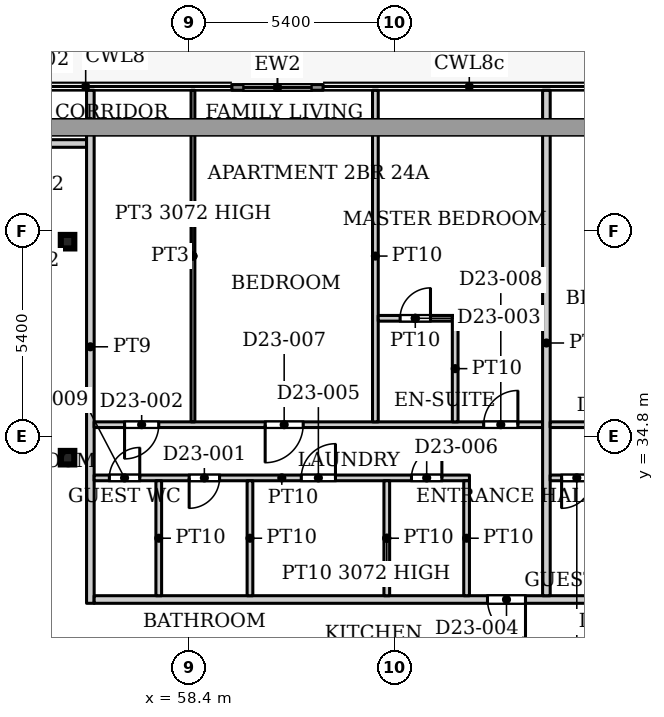
"""IFC4 building model, lengths in metres.
Left out: names, types, materials, properties, quantities, classifications, styles, units other than length and angle.
Written with IfcOpenShell. Run it as: python <this file> out.ifc"""

import sys

from ifc_helpers import new_model, si_unit, direction, frame, frame_2d, origin, origin_2d, place, context, subcontext, project, spatial, rectangle, hollow_rectangle, extrude, source, transform, mapped, element, fill, save


model = new_model("IFC4")
c1 = context("Model", 3, precision=1e-05, world=origin(), true_north=direction((0.0, 1.0)))
c2 = subcontext(c1, "Body", "Model", "MODEL_VIEW")
j1 = project(units=[si_unit("LENGTHUNIT", "METRE"), si_unit("PLANEANGLEUNIT", "RADIAN")], contexts=[c1])
p1 = place(None, origin())
s1 = spatial("IfcSite", under=j1, at=p1, CompositionType="ELEMENT")
p2 = place(p1, origin())
s2 = spatial("IfcBuilding", under=s1, at=p2, CompositionType="ELEMENT")
p3 = place(p2, frame((0.0, 0.0, 105.8)))
s3 = spatial("IfcBuildingStorey", under=s2, at=p3, CompositionType="ELEMENT", Elevation=105.8)
for number, where, z_axis, x_axis in (
    (1, (55.2, 34.232, 0.0), (0.0, 0.0, 1.0), (1.0, 0.0, 0.0)),
    (2, (55.2, 39.916, 0.0), (0.0, 0.0, 1.0), (1.0, 0.0, 0.0)),
):
    element("IfcColumn", number, at=place(p3, frame(where, z_axis=z_axis, x_axis=x_axis)), inside=s3, PredefinedType="COLUMN", context=c2, shape_type="SweptSolid", body=[
        extrude(hollow_rectangle(XDim=0.356, YDim=0.356, WallThickness=0.016, InnerFilletRadius=0.016, OuterFilletRadius=0.032, at=origin_2d()), origin(), (0.0, 0.0, 1.0), 3.9),
    ])
p4 = place(p3, frame((59.524, 43.975, 0.0), z_axis=(0.0, 0.0, 1.0), x_axis=(1.0, 0.0, 0.0)))
e3 = element("IfcWall", 3, at=p4, inside=s3, PredefinedType="SOLIDWALL", context=c2, shape_type="SweptSolid", body=[
    extrude(rectangle(XDim=2.4, YDim=0.15, at=frame_2d((1.2, 0.0))), origin(), (0.0, 0.0, 1.0), 3.75),
])
p5 = place(p4, frame((0.3, 0.0, 0.0)))
e4 = element("IfcOpeningElement", 4, at=p5, cuts=e3, PredefinedType="OPENING", context=c2, shape_type="SweptSolid", body=[
    extrude(rectangle(XDim=1.8, YDim=2.4, at=frame_2d((0.9, 1.2))), frame((0.0, 0.085, 0.0), z_axis=(0.0, -1.0, 0.0), x_axis=(1.0, 0.0, 0.0)), (0.0, 0.0, 1.0), 0.17),
])
p6 = place(p3, frame((53.5, 42.5, 0.0), z_axis=(0.0, 0.0, 1.0), x_axis=(1.0, 0.0, 0.0)))
e5 = element("IfcWall", 5, at=p6, inside=s3, PredefinedType="PARTITIONING", context=c2, shape_type="SweptSolid", body=[
    extrude(rectangle(XDim=2.2, YDim=0.2, at=frame_2d((1.1, 0.0))), origin(), (0.0, 0.0, 1.0), 3.6),
])
p7 = place(p6, frame((0.15, 0.0, 0.0)))
e6 = element("IfcOpeningElement", 6, at=p7, cuts=e5, PredefinedType="OPENING", context=c2, shape_type="SweptSolid", body=[
    extrude(rectangle(XDim=1.0, YDim=2.1, at=frame_2d((0.5, 1.05))), frame((0.0, 0.11, 0.0), z_axis=(0.0, -1.0, 0.0), x_axis=(1.0, 0.0, 0.0)), (0.0, 0.0, 1.0), 0.22),
])
p8 = place(p3, frame((55.8, 30.4, 0.0), z_axis=(0.0, 0.0, 1.0), x_axis=(0.0, 1.0, 0.0)))
e7 = element("IfcWall", 7, at=p8, inside=s3, PredefinedType="PARTITIONING", context=c2, shape_type="SweptSolid", body=[
    extrude(rectangle(XDim=13.5, YDim=0.2, at=frame_2d((6.75, 0.0))), origin(), (0.0, 0.0, 1.0), 3.6),
])
p9 = place(p3, frame((55.9, 30.5, 0.0), z_axis=(0.0, 0.0, 1.0), x_axis=(1.0, 0.0, 0.0)))
e8 = element("IfcWall", 8, at=p9, inside=s3, PredefinedType="PARTITIONING", context=c2, shape_type="SweptSolid", body=[
    extrude(rectangle(XDim=42.2, YDim=0.2, at=frame_2d((21.1, 0.0))), origin(), (0.0, 0.0, 1.0), 3.6),
])
p10 = place(p9, frame((10.35, 0.0, 0.0)))
e9 = element("IfcOpeningElement", 9, at=p10, cuts=e8, PredefinedType="OPENING", context=c2, shape_type="SweptSolid", body=[
    extrude(rectangle(XDim=1.0, YDim=2.1, at=frame_2d((0.5, 1.05))), frame((0.0, 0.11, 0.0), z_axis=(0.0, -1.0, 0.0), x_axis=(1.0, 0.0, 0.0)), (0.0, 0.0, 1.0), 0.22),
])
p11 = place(p9, frame((16.65, 0.0, 0.0)))
e10 = element("IfcOpeningElement", 10, at=p11, cuts=e8, PredefinedType="OPENING", context=c2, shape_type="SweptSolid", body=[
    extrude(rectangle(XDim=1.0, YDim=2.1, at=frame_2d((0.5, 1.05))), frame((0.0, 0.11, 0.0), z_axis=(0.0, -1.0, 0.0), x_axis=(1.0, 0.0, 0.0)), (0.0, 0.0, 1.0), 0.22),
])
p12 = place(p9, frame((27.6, 0.0, 0.0)))
e11 = element("IfcOpeningElement", 11, at=p12, cuts=e8, PredefinedType="OPENING", context=c2, shape_type="SweptSolid", body=[
    extrude(rectangle(XDim=1.0, YDim=2.1, at=frame_2d((0.5, 1.05))), frame((0.0, 0.11, 0.0), z_axis=(0.0, -1.0, 0.0), x_axis=(1.0, 0.0, 0.0)), (0.0, 0.0, 1.0), 0.22),
])
p13 = place(p9, frame((36.0, 0.0, 0.0)))
e12 = element("IfcOpeningElement", 12, at=p13, cuts=e8, PredefinedType="OPENING", context=c2, shape_type="SweptSolid", body=[
    extrude(rectangle(XDim=1.0, YDim=2.1, at=frame_2d((0.5, 1.05))), frame((0.0, 0.11, 0.0), z_axis=(0.0, -1.0, 0.0), x_axis=(1.0, 0.0, 0.0)), (0.0, 0.0, 1.0), 0.22),
])
p14 = place(p3, frame((55.9, 33.7, 0.0), z_axis=(0.0, 0.0, 1.0), x_axis=(1.0, 0.0, 0.0)))
e13 = element("IfcWall", 13, at=p14, inside=s3, PredefinedType="PARTITIONING", context=c2, shape_type="SweptSolid", body=[
    extrude(rectangle(XDim=9.875, YDim=0.15, at=frame_2d((4.938, 0.0))), origin(), (0.0, 0.0, 1.0), 3.6),
])
p15 = place(p14, frame((2.5, 0.0, 0.0)))
e14 = element("IfcOpeningElement", 14, at=p15, cuts=e13, PredefinedType="OPENING", context=c2, shape_type="SweptSolid", body=[
    extrude(rectangle(XDim=0.8, YDim=2.1, at=frame_2d((0.4, 1.05))), frame((0.0, 0.085, 0.0), z_axis=(0.0, -1.0, 0.0), x_axis=(1.0, 0.0, 0.0)), (0.0, 0.0, 1.0), 0.17),
])
p16 = place(p14, frame((5.45, 0.0, 0.0)))
e15 = element("IfcOpeningElement", 15, at=p16, cuts=e13, PredefinedType="OPENING", context=c2, shape_type="SweptSolid", body=[
    extrude(rectangle(XDim=0.9, YDim=2.1, at=frame_2d((0.45, 1.05))), frame((0.0, 0.085, 0.0), z_axis=(0.0, -1.0, 0.0), x_axis=(1.0, 0.0, 0.0)), (0.0, 0.0, 1.0), 0.17),
])
p17 = place(p14, frame((8.35, 0.0, 0.0)))
e16 = element("IfcOpeningElement", 16, at=p17, cuts=e13, PredefinedType="OPENING", context=c2, shape_type="SweptSolid", body=[
    extrude(rectangle(XDim=0.8, YDim=2.1, at=frame_2d((0.4, 1.05))), frame((0.0, 0.085, 0.0), z_axis=(0.0, -1.0, 0.0), x_axis=(1.0, 0.0, 0.0)), (0.0, 0.0, 1.0), 0.17),
])
p18 = place(p14, frame((0.4, 0.0, 0.0)))
e17 = element("IfcOpeningElement", 17, at=p18, cuts=e13, PredefinedType="OPENING", context=c2, shape_type="SweptSolid", body=[
    extrude(rectangle(XDim=0.8, YDim=2.1, at=frame_2d((0.4, 1.05))), frame((0.0, 0.085, 0.0), z_axis=(0.0, -1.0, 0.0), x_axis=(1.0, 0.0, 0.0)), (0.0, 0.0, 1.0), 0.17),
])
p19 = place(p3, frame((55.9, 35.1, 0.0), z_axis=(0.0, 0.0, 1.0), x_axis=(1.0, 0.0, 0.0)))
e18 = element("IfcWall", 18, at=p19, inside=s3, PredefinedType="PARTITIONING", context=c2, shape_type="SweptSolid", body=[
    extrude(rectangle(XDim=11.8, YDim=0.15, at=frame_2d((5.9, 0.0))), origin(), (0.0, 0.0, 1.0), 3.6),
])
p20 = place(p19, frame((0.8, 0.0, 0.0)))
e19 = element("IfcOpeningElement", 19, at=p20, cuts=e18, PredefinedType="OPENING", context=c2, shape_type="SweptSolid", body=[
    extrude(rectangle(XDim=0.9, YDim=2.1, at=frame_2d((0.45, 1.05))), frame((0.0, 0.085, 0.0), z_axis=(0.0, -1.0, 0.0), x_axis=(1.0, 0.0, 0.0)), (0.0, 0.0, 1.0), 0.17),
])
p21 = place(p19, frame((4.5, 0.0, 0.0)))
e20 = element("IfcOpeningElement", 20, at=p21, cuts=e18, PredefinedType="OPENING", context=c2, shape_type="SweptSolid", body=[
    extrude(rectangle(XDim=1.0, YDim=2.1, at=frame_2d((0.5, 1.05))), frame((0.0, 0.085, 0.0), z_axis=(0.0, -1.0, 0.0), x_axis=(1.0, 0.0, 0.0)), (0.0, 0.0, 1.0), 0.17),
])
p22 = place(p19, frame((10.25, 0.0, 0.0)))
e21 = element("IfcOpeningElement", 21, at=p22, cuts=e18, PredefinedType="OPENING", context=c2, shape_type="SweptSolid", body=[
    extrude(rectangle(XDim=0.9, YDim=2.1, at=frame_2d((0.45, 1.05))), frame((0.0, 0.085, 0.0), z_axis=(0.0, -1.0, 0.0), x_axis=(1.0, 0.0, 0.0)), (0.0, 0.0, 1.0), 0.17),
])
p23 = place(p3, frame((57.6, 30.6, 0.0), z_axis=(0.0, 0.0, 1.0), x_axis=(0.0, 1.0, 0.0)))
e22 = element("IfcWall", 22, at=p23, inside=s3, PredefinedType="PARTITIONING", context=c2, shape_type="SweptSolid", body=[
    extrude(rectangle(XDim=3.025, YDim=0.15, at=frame_2d((1.512, 0.0))), origin(), (0.0, 0.0, 1.0), 3.6),
])
p24 = place(p3, frame((58.5, 35.175, 0.0), z_axis=(0.0, 0.0, 1.0), x_axis=(0.0, 1.0, 0.0)))
e23 = element("IfcWall", 23, at=p24, inside=s3, PredefinedType="PARTITIONING", context=c2, shape_type="SweptSolid", body=[
    extrude(rectangle(XDim=8.725, YDim=0.1, at=frame_2d((4.362, 0.0))), origin(), (0.0, 0.0, 1.0), 3.072),
])
p25 = place(p3, frame((60.0, 30.6, 0.0), z_axis=(0.0, 0.0, 1.0), x_axis=(0.0, 1.0, 0.0)))
e24 = element("IfcWall", 24, at=p25, inside=s3, PredefinedType="PARTITIONING", context=c2, shape_type="SweptSolid", body=[
    extrude(rectangle(XDim=3.025, YDim=0.15, at=frame_2d((1.512, 0.0))), origin(), (0.0, 0.0, 1.0), 3.6),
])
p26 = place(p3, frame((63.3, 35.175, 0.0), z_axis=(0.0, 0.0, 1.0), x_axis=(0.0, 1.0, 0.0)))
e25 = element("IfcWall", 25, at=p26, inside=s3, PredefinedType="PARTITIONING", context=c2, shape_type="SweptSolid", body=[
    extrude(rectangle(XDim=8.725, YDim=0.15, at=frame_2d((4.362, 0.0))), origin(), (0.0, 0.0, 1.0), 3.6),
])
p27 = place(p3, frame((63.375, 37.9, 0.0), z_axis=(0.0, 0.0, 1.0), x_axis=(1.0, 0.0, 0.0)))
e26 = element("IfcWall", 26, at=p27, inside=s3, PredefinedType="PARTITIONING", context=c2, shape_type="SweptSolid", body=[
    extrude(rectangle(XDim=1.95, YDim=0.15, at=frame_2d((0.975, 0.0))), origin(), (0.0, 0.0, 1.0), 3.6),
])
p28 = place(p27, frame((0.575, 0.0, 0.0)))
e27 = element("IfcOpeningElement", 27, at=p28, cuts=e26, PredefinedType="OPENING", context=c2, shape_type="SweptSolid", body=[
    extrude(rectangle(XDim=0.8, YDim=2.1, at=frame_2d((0.4, 1.05))), frame((0.0, 0.085, 0.0), z_axis=(0.0, -1.0, 0.0), x_axis=(1.0, 0.0, 0.0)), (0.0, 0.0, 1.0), 0.17),
])
p29 = place(p3, frame((63.6, 30.6, 0.0), z_axis=(0.0, 0.0, 1.0), x_axis=(0.0, 1.0, 0.0)))
e28 = element("IfcWall", 28, at=p29, inside=s3, PredefinedType="PARTITIONING", context=c2, shape_type="SweptSolid", body=[
    extrude(rectangle(XDim=3.025, YDim=0.15, at=frame_2d((1.512, 0.0))), origin(), (0.0, 0.0, 1.0), 3.072),
])
p30 = place(p3, frame((65.4, 35.175, 0.0), z_axis=(0.0, 0.0, 1.0), x_axis=(0.0, 1.0, 0.0)))
e29 = element("IfcWall", 29, at=p30, inside=s3, PredefinedType="PARTITIONING", context=c2, shape_type="SweptSolid", body=[
    extrude(rectangle(XDim=2.8, YDim=0.15, at=frame_2d((1.4, 0.0))), origin(), (0.0, 0.0, 1.0), 3.6),
])
p31 = place(p3, frame((65.7, 30.6, 0.0), z_axis=(0.0, 0.0, 1.0), x_axis=(0.0, 1.0, 0.0)))
e30 = element("IfcWall", 30, at=p31, inside=s3, PredefinedType="PARTITIONING", context=c2, shape_type="SweptSolid", body=[
    extrude(rectangle(XDim=3.025, YDim=0.15, at=frame_2d((1.512, 0.0))), origin(), (0.0, 0.0, 1.0), 3.6),
])
p32 = place(p3, frame((67.8, 30.6, 0.0), z_axis=(0.0, 0.0, 1.0), x_axis=(0.0, 1.0, 0.0)))
e31 = element("IfcWall", 31, at=p32, inside=s3, PredefinedType="PARTITIONING", context=c2, shape_type="SweptSolid", body=[
    extrude(rectangle(XDim=13.3, YDim=0.2, at=frame_2d((6.65, 0.0))), origin(), (0.0, 0.0, 1.0), 3.6),
])
p33 = place(p3, frame((67.9, 33.7, 0.0), z_axis=(0.0, 0.0, 1.0), x_axis=(1.0, 0.0, 0.0)))
e32 = element("IfcWall", 32, at=p33, inside=s3, PredefinedType="PARTITIONING", context=c2, shape_type="SweptSolid", body=[
    extrude(rectangle(XDim=4.175, YDim=0.15, at=frame_2d((2.087, 0.0))), origin(), (0.0, 0.0, 1.0), 3.6),
])
p34 = place(p33, frame((2.5, 0.0, 0.0)))
e33 = element("IfcOpeningElement", 33, at=p34, cuts=e32, PredefinedType="OPENING", context=c2, shape_type="SweptSolid", body=[
    extrude(rectangle(XDim=0.8, YDim=2.1, at=frame_2d((0.4, 1.05))), frame((0.0, 0.085, 0.0), z_axis=(0.0, -1.0, 0.0), x_axis=(1.0, 0.0, 0.0)), (0.0, 0.0, 1.0), 0.17),
])
p35 = place(p33, frame((0.3, 0.0, 0.0)))
e34 = element("IfcOpeningElement", 34, at=p35, cuts=e32, PredefinedType="OPENING", context=c2, shape_type="SweptSolid", body=[
    extrude(rectangle(XDim=0.8, YDim=2.1, at=frame_2d((0.4, 1.05))), frame((0.0, 0.085, 0.0), z_axis=(0.0, -1.0, 0.0), x_axis=(1.0, 0.0, 0.0)), (0.0, 0.0, 1.0), 0.17),
])
p36 = place(p3, frame((67.9, 35.1, 0.0), z_axis=(0.0, 0.0, 1.0), x_axis=(1.0, 0.0, 0.0)))
e35 = element("IfcWall", 35, at=p36, inside=s3, PredefinedType="PARTITIONING", context=c2, shape_type="SweptSolid", body=[
    extrude(rectangle(XDim=9.4, YDim=0.15, at=frame_2d((4.7, 0.0))), origin(), (0.0, 0.0, 1.0), 3.6),
])
p37 = place(p36, frame((1.4, 0.0, 0.0)))
e36 = element("IfcOpeningElement", 36, at=p37, cuts=e35, PredefinedType="OPENING", context=c2, shape_type="SweptSolid", body=[
    extrude(rectangle(XDim=0.9, YDim=2.1, at=frame_2d((0.45, 1.05))), frame((0.0, 0.085, 0.0), z_axis=(0.0, -1.0, 0.0), x_axis=(1.0, 0.0, 0.0)), (0.0, 0.0, 1.0), 0.17),
])
p38 = place(p36, frame((6.15, 0.0, 0.0)))
e37 = element("IfcOpeningElement", 37, at=p38, cuts=e35, PredefinedType="OPENING", context=c2, shape_type="SweptSolid", body=[
    extrude(rectangle(XDim=1.0, YDim=2.1, at=frame_2d((0.5, 1.05))), frame((0.0, 0.085, 0.0), z_axis=(0.0, -1.0, 0.0), x_axis=(1.0, 0.0, 0.0)), (0.0, 0.0, 1.0), 0.17),
])
m1 = source(origin(), c2, "Body", "SweptSolid", [
    extrude(rectangle(XDim=1.8, YDim=2.4, at=frame_2d((0.9, 1.2))), frame((0.0, 0.025, 0.0), z_axis=(0.0, -1.0, 0.0), x_axis=(1.0, 0.0, 0.0)), (0.0, 0.0, 1.0), 0.05),
])
p39 = place(p5, origin())
e38 = element("IfcDoor", 38, at=p39, inside=s3, OperationType="SLIDING_TO_LEFT", PredefinedType="DOOR", context=c2, shape_type="MappedRepresentation", body=[
    mapped(m1, transform((0.0, 0.0, 0.0), x_axis=(1.0, 0.0, 0.0), y_axis=(0.0, 1.0, 0.0), z_axis=(0.0, 0.0, 1.0), scale=1.0)),
])
fill(e4, e38)
m2 = source(origin(), c2, "Body", "SweptSolid", [
    extrude(rectangle(XDim=0.8, YDim=2.1, at=frame_2d((0.4, 1.05))), frame((0.0, 0.025, 0.0), z_axis=(0.0, -1.0, 0.0), x_axis=(1.0, 0.0, 0.0)), (0.0, 0.0, 1.0), 0.05),
])
p40 = place(p15, origin())
e39 = element("IfcDoor", 39, at=p40, inside=s3, OperationType="SINGLE_SWING_RIGHT", PredefinedType="DOOR", context=c2, shape_type="MappedRepresentation", body=[
    mapped(m2, transform((0.0, 0.0, 0.0), x_axis=(1.0, 0.0, 0.0), y_axis=(0.0, 1.0, 0.0), z_axis=(0.0, 0.0, 1.0), scale=1.0)),
])
fill(e14, e39)
m3 = source(origin(), c2, "Body", "SweptSolid", [
    extrude(rectangle(XDim=0.9, YDim=2.1, at=frame_2d((0.45, 1.05))), frame((0.0, 0.025, 0.0), z_axis=(0.0, -1.0, 0.0), x_axis=(1.0, 0.0, 0.0)), (0.0, 0.0, 1.0), 0.05),
])
p41 = place(p20, origin())
e40 = element("IfcDoor", 40, at=p41, inside=s3, OperationType="SINGLE_SWING_RIGHT", PredefinedType="DOOR", context=c2, shape_type="MappedRepresentation", body=[
    mapped(m3, transform((0.0, 0.0, 0.0), x_axis=(1.0, 0.0, 0.0), y_axis=(0.0, 1.0, 0.0), z_axis=(0.0, 0.0, 1.0), scale=1.0)),
])
fill(e19, e40)
p42 = place(p28, origin())
e41 = element("IfcDoor", 41, at=p42, inside=s3, OperationType="SINGLE_SWING_LEFT", PredefinedType="DOOR", context=c2, shape_type="MappedRepresentation", body=[
    mapped(m2, transform((0.0, 0.0, 0.0), x_axis=(1.0, 0.0, 0.0), y_axis=(0.0, 1.0, 0.0), z_axis=(0.0, 0.0, 1.0), scale=1.0)),
])
fill(e27, e41)
m4 = source(origin(), c2, "Body", "SweptSolid", [
    extrude(rectangle(XDim=1.0, YDim=2.1, at=frame_2d((0.5, 1.05))), frame((0.0, 0.025, 0.0), z_axis=(0.0, -1.0, 0.0), x_axis=(1.0, 0.0, 0.0)), (0.0, 0.0, 1.0), 0.05),
])
p43 = place(p10, origin())
e42 = element("IfcDoor", 42, at=p43, inside=s3, OperationType="SINGLE_SWING_RIGHT", PredefinedType="DOOR", context=c2, shape_type="MappedRepresentation", body=[
    mapped(m4, transform((0.0, 0.0, 0.0), x_axis=(1.0, 0.0, 0.0), y_axis=(0.0, 1.0, 0.0), z_axis=(0.0, 0.0, 1.0), scale=1.0)),
])
fill(e9, e42)
p44 = place(p16, origin())
e43 = element("IfcDoor", 43, at=p44, inside=s3, OperationType="SINGLE_SWING_LEFT", PredefinedType="DOOR", context=c2, shape_type="MappedRepresentation", body=[
    mapped(m3, transform((0.0, 0.0, 0.0), x_axis=(1.0, 0.0, 0.0), y_axis=(0.0, 1.0, 0.0), z_axis=(0.0, 0.0, 1.0), scale=1.0)),
])
fill(e15, e43)
p45 = place(p17, origin())
e44 = element("IfcDoor", 44, at=p45, inside=s3, OperationType="SINGLE_SWING_LEFT", PredefinedType="DOOR", context=c2, shape_type="MappedRepresentation", body=[
    mapped(m2, transform((0.0, 0.0, 0.0), x_axis=(1.0, 0.0, 0.0), y_axis=(0.0, 1.0, 0.0), z_axis=(0.0, 0.0, 1.0), scale=1.0)),
])
fill(e16, e44)
m5 = source(origin(), c2, "Body", "SweptSolid", [
    extrude(rectangle(XDim=1.0, YDim=2.1, at=frame_2d((0.5, 1.05))), frame((0.0, 0.025, 0.0), z_axis=(0.0, -1.0, 0.0), x_axis=(1.0, 0.0, 0.0)), (0.0, 0.0, 1.0), 0.05),
])
p46 = place(p21, origin())
e45 = element("IfcDoor", 45, at=p46, inside=s3, OperationType="SINGLE_SWING_RIGHT", PredefinedType="DOOR", context=c2, shape_type="MappedRepresentation", body=[
    mapped(m5, transform((0.0, 0.0, 0.0), x_axis=(1.0, 0.0, 0.0), y_axis=(0.0, 1.0, 0.0), z_axis=(0.0, 0.0, 1.0), scale=1.0)),
])
fill(e20, e45)
p47 = place(p22, origin())
e46 = element("IfcDoor", 46, at=p47, inside=s3, OperationType="SINGLE_SWING_LEFT", PredefinedType="DOOR", context=c2, shape_type="MappedRepresentation", body=[
    mapped(m3, transform((0.0, 0.0, 0.0), x_axis=(1.0, 0.0, 0.0), y_axis=(0.0, 1.0, 0.0), z_axis=(0.0, 0.0, 1.0), scale=1.0)),
])
fill(e21, e46)
p48 = place(p18, origin())
e47 = element("IfcDoor", 47, at=p48, inside=s3, OperationType="SINGLE_SWING_LEFT", PredefinedType="DOOR", context=c2, shape_type="MappedRepresentation", body=[
    mapped(m2, transform((0.0, 0.0, 0.0), x_axis=(1.0, 0.0, 0.0), y_axis=(0.0, 1.0, 0.0), z_axis=(0.0, 0.0, 1.0), scale=1.0)),
])
fill(e17, e47)
p49 = place(p35, origin())
e48 = element("IfcDoor", 48, at=p49, inside=s3, OperationType="SINGLE_SWING_RIGHT", PredefinedType="DOOR", context=c2, shape_type="MappedRepresentation", body=[
    mapped(m2, transform((0.0, 0.0, 0.0), x_axis=(1.0, 0.0, 0.0), y_axis=(0.0, 1.0, 0.0), z_axis=(0.0, 0.0, 1.0), scale=1.0)),
])
fill(e34, e48)
save(model, sys.argv[1])
